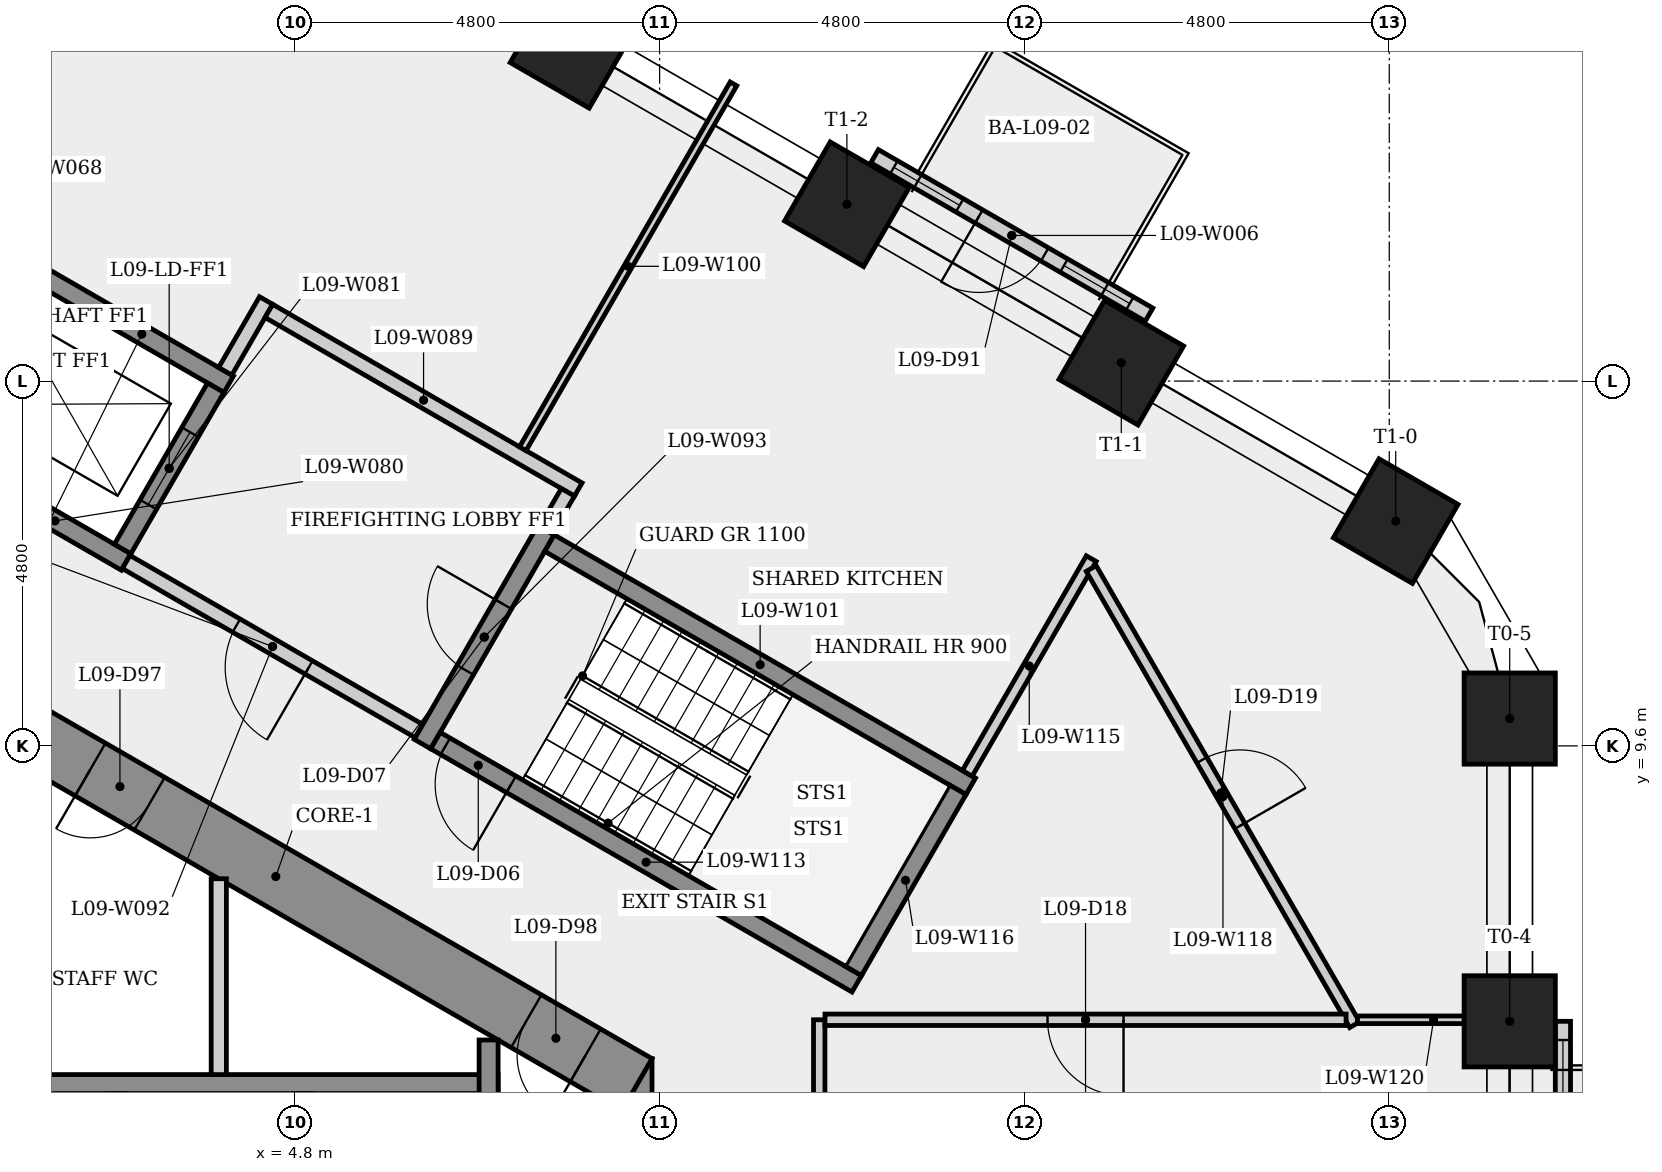
"""IFC4 building model, lengths in metres.
Left out: names, types, materials, properties, quantities, classifications, styles, units other than length and angle.
Written with IfcOpenShell. Run it as: python <this file> out.ifc"""

import sys

from ifc_helpers import new_model, si_unit, direction, frame, frame_2d, origin, origin_2d, place, context, subcontext, project, spatial, rectangle, extrude, element, fill, save


model = new_model("IFC4")
c1 = context("Model", 3, precision=1e-05, world=origin(), true_north=direction((0.0, 1.0)))
c2 = subcontext(c1, "Body", "Model", "MODEL_VIEW")
j1 = project(units=[si_unit("LENGTHUNIT", "METRE"), si_unit("PLANEANGLEUNIT", "RADIAN")], contexts=[c1])
p1 = place(None, origin())
s1 = spatial("IfcSite", under=j1, at=p1, CompositionType="ELEMENT")
p2 = place(p1, origin())
s2 = spatial("IfcBuilding", under=s1, at=p2, CompositionType="ELEMENT")
p3 = place(p2, frame((0.0, 0.0, 39.1)))
s3 = spatial("IfcBuildingStorey", under=s2, at=p3, CompositionType="ELEMENT", Elevation=39.1)
p4 = place(p3, frame((9.1, -5.485, 0.0), z_axis=(0.0, 0.0, 1.0), x_axis=(0.0, 1.0, 0.0)))
e1 = element("IfcWall", 1, at=p4, inside=s3, PredefinedType="SHEAR", context=c2, shape_type="SweptSolid", body=[
    extrude(rectangle(XDim=10.97, YDim=0.8, at=frame_2d((5.485, 0.0))), origin(), (0.0, 0.0, 1.0), 3.4),
])
p5 = place(p4, frame((4.685, 0.0, 0.0)))
e2 = element("IfcOpeningElement", 2, at=p5, cuts=e1, PredefinedType="OPENING", context=c2, shape_type="SweptSolid", body=[
    extrude(rectangle(XDim=1.6, YDim=2.1, at=frame_2d((0.8, 1.05))), frame((0.0, 0.41, 0.0), z_axis=(0.0, -1.0, 0.0), x_axis=(1.0, 0.0, 0.0)), (0.0, 0.0, 1.0), 0.82),
])
p6 = place(p3, frame((9.3, 5.138, 0.0), z_axis=(0.0, 0.0, 1.0), x_axis=(-0.866023993627, 0.500002442456, 0.0)))
e3 = element("IfcWall", 3, at=p6, inside=s3, PredefinedType="SHEAR", context=c2, shape_type="SweptSolid", body=[
    extrude(rectangle(XDim=10.97, YDim=0.8, at=frame_2d((5.485, 0.0))), origin(), (0.0, 0.0, 1.0), 3.4),
])
p7 = place(p6, frame((7.403, 0.0, 0.0)))
e4 = element("IfcOpeningElement", 4, at=p7, cuts=e3, PredefinedType="OPENING", context=c2, shape_type="SweptSolid", body=[
    extrude(rectangle(XDim=0.9, YDim=2.1, at=frame_2d((0.45, 1.05))), frame((0.0, 0.41, 0.0), z_axis=(0.0, -1.0, 0.0), x_axis=(1.0, 0.0, 0.0)), (0.0, 0.0, 1.0), 0.82),
])
p8 = place(p6, frame((0.78, 0.0, 0.0)))
e5 = element("IfcOpeningElement", 5, at=p8, cuts=e3, PredefinedType="OPENING", context=c2, shape_type="SweptSolid", body=[
    extrude(rectangle(XDim=0.9, YDim=2.1, at=frame_2d((0.45, 1.05))), frame((0.0, 0.41, 0.0), z_axis=(0.0, -1.0, 0.0), x_axis=(1.0, 0.0, 0.0)), (0.0, 0.0, 1.0), 0.82),
])
for number, where, z_axis, x_axis in (
    (6, (20.785, 5.976, 0.0), (0.0, 0.0, 1.0), (1.0, 0.0, 0.0)),
    (7, (20.785, 9.959, 0.0), (0.0, 0.0, 1.0), (1.0, 0.0, 0.0)),
    (8, (19.285, 12.558, 0.0), (0.0, 0.0, 1.0), (0.5, 0.866, 0.0)),
    (9, (15.674, 14.642, 0.0), (0.0, 0.0, 1.0), (0.5, 0.866, 0.0)),
    (10, (12.064, 16.727, 0.0), (0.0, 0.0, 1.0), (0.5, 0.866, 0.0)),
    (11, (8.454, 18.811, 0.0), (0.0, 0.0, 1.0), (0.5, 0.866, 0.0)),
):
    element("IfcColumn", number, at=place(p3, frame(where, z_axis=z_axis, x_axis=x_axis)), inside=s3, PredefinedType="COLUMN", context=c2, shape_type="SweptSolid", body=[
        extrude(rectangle(XDim=1.2, YDim=1.2, at=origin_2d()), origin(), (0.0, 0.0, 1.0), 3.4),
    ])
p9 = place(p3, frame((21.485, 1.992, 0.0), z_axis=(0.0, 0.0, 1.0), x_axis=(0.0, 1.0, 0.0)))
e12 = element("IfcWall", 12, at=p9, inside=s3, PredefinedType="SOLIDWALL", context=c2, shape_type="SweptSolid", body=[
    extrude(rectangle(XDim=3.984, YDim=0.2, at=frame_2d((1.992, 0.0))), origin(), (0.0, 0.0, 1.0), 3.4),
])
p10 = place(p9, frame((1.492, 0.0, 0.0)))
e13 = element("IfcOpeningElement", 13, at=p10, cuts=e12, PredefinedType="OPENING", context=c2, shape_type="SweptSolid", body=[
    extrude(rectangle(XDim=1.0, YDim=2.4, at=frame_2d((0.5, 1.2))), frame((0.0, 0.11, 0.0), z_axis=(0.0, -1.0, 0.0), x_axis=(1.0, 0.0, 0.0)), (0.0, 0.0, 1.0), 0.22),
])
p11 = place(p9, frame((0.246, 0.0, 0.9)))
e14 = element("IfcOpeningElement", 14, at=p11, cuts=e12, PredefinedType="OPENING", context=c2, shape_type="SweptSolid", body=[
    extrude(rectangle(XDim=1.0, YDim=1.5, at=frame_2d((0.5, 0.75))), frame((0.0, 0.11, 0.0), z_axis=(0.0, -1.0, 0.0), x_axis=(1.0, 0.0, 0.0)), (0.0, 0.0, 1.0), 0.22),
])
p12 = place(p9, frame((2.738, 0.0, 0.9)))
e15 = element("IfcOpeningElement", 15, at=p12, cuts=e12, PredefinedType="OPENING", context=c2, shape_type="SweptSolid", body=[
    extrude(rectangle(XDim=1.0, YDim=1.5, at=frame_2d((0.5, 0.75))), frame((0.0, 0.11, 0.0), z_axis=(0.0, -1.0, 0.0), x_axis=(1.0, 0.0, 0.0)), (0.0, 0.0, 1.0), 0.22),
])
p13 = place(p3, frame((16.039, 15.274, 0.0), z_axis=(0.0, 0.0, 1.0), x_axis=(-0.866036386482, 0.499980976928, 0.0)))
e16 = element("IfcWall", 16, at=p13, inside=s3, PredefinedType="SOLIDWALL", context=c2, shape_type="SweptSolid", body=[
    extrude(rectangle(XDim=4.169, YDim=0.2, at=frame_2d((2.084, 0.0))), origin(), (0.0, 0.0, 1.0), 3.4),
])
p14 = place(p13, frame((1.584, 0.0, 0.0)))
e17 = element("IfcOpeningElement", 17, at=p14, cuts=e16, PredefinedType="OPENING", context=c2, shape_type="SweptSolid", body=[
    extrude(rectangle(XDim=1.0, YDim=2.4, at=frame_2d((0.5, 1.2))), frame((0.0, 0.11, 0.0), z_axis=(0.0, -1.0, 0.0), x_axis=(1.0, 0.0, 0.0)), (0.0, 0.0, 1.0), 0.22),
])
p15 = place(p13, frame((0.292, 0.0, 0.9)))
e18 = element("IfcOpeningElement", 18, at=p15, cuts=e16, PredefinedType="OPENING", context=c2, shape_type="SweptSolid", body=[
    extrude(rectangle(XDim=1.0, YDim=1.5, at=frame_2d((0.5, 0.75))), frame((0.0, 0.11, 0.0), z_axis=(0.0, -1.0, 0.0), x_axis=(1.0, 0.0, 0.0)), (0.0, 0.0, 1.0), 0.22),
])
p16 = place(p13, frame((2.877, 0.0, 0.9)))
e19 = element("IfcOpeningElement", 19, at=p16, cuts=e16, PredefinedType="OPENING", context=c2, shape_type="SweptSolid", body=[
    extrude(rectangle(XDim=1.0, YDim=1.5, at=frame_2d((0.5, 0.75))), frame((0.0, 0.11, 0.0), z_axis=(0.0, -1.0, 0.0), x_axis=(1.0, 0.0, 0.0)), (0.0, 0.0, 1.0), 0.22),
])
p17 = place(p3, frame((-7.225, 5.15, 0.0), z_axis=(0.0, 0.0, 1.0), x_axis=(1.0, 0.0, 0.0)))
e20 = element("IfcWall", 20, at=p17, inside=s3, PredefinedType="SHEAR", context=c2, shape_type="SweptSolid", body=[
    extrude(rectangle(XDim=14.7, YDim=0.25, at=frame_2d((7.35, 0.0))), origin(), (0.0, 0.0, 1.0), 3.05),
])
p18 = place(p3, frame((1.073, 16.008, 0.0), z_axis=(0.0, 0.0, 1.0), x_axis=(0.866040211805, -0.499974350878, 0.0)))
e21 = element("IfcWall", 21, at=p18, inside=s3, PredefinedType="SHEAR", context=c2, shape_type="SweptSolid", body=[
    extrude(rectangle(XDim=3.3, YDim=0.25, at=frame_2d((1.65, 0.0))), origin(), (0.0, 0.0, 1.0), 3.05),
])
p19 = place(p3, frame((2.581, 12.02, 0.0), z_axis=(0.0, 0.0, 1.0), x_axis=(-0.86603892542, 0.499976579108, 0.0)))
e22 = element("IfcWall", 22, at=p19, inside=s3, PredefinedType="SHEAR", context=c2, shape_type="SweptSolid", body=[
    extrude(rectangle(XDim=2.162, YDim=0.25, at=frame_2d((1.081, 0.0))), origin(), (0.0, 0.0, 1.0), 3.05),
])
p20 = place(p3, frame((2.535, 12.191, 0.0), z_axis=(0.0, 0.0, 1.0), x_axis=(0.500061746146, 0.865989751695, 0.0)))
e23 = element("IfcWall", 23, at=p20, inside=s3, PredefinedType="SHEAR", context=c2, shape_type="SweptSolid", body=[
    extrude(rectangle(XDim=2.45, YDim=0.25, at=frame_2d((1.225, 0.0))), origin(), (0.0, 0.0, 1.0), 3.4),
])
p21 = place(p20, frame((0.675, 0.0, 0.0)))
e24 = element("IfcOpeningElement", 24, at=p21, cuts=e23, PredefinedType="OPENING", context=c2, shape_type="SweptSolid", body=[
    extrude(rectangle(XDim=1.1, YDim=2.1, at=frame_2d((0.55, 1.05))), frame((0.0, 0.135, 0.0), z_axis=(0.0, -1.0, 0.0), x_axis=(1.0, 0.0, 0.0)), (0.0, 0.0, 1.0), 0.27),
])
p22 = place(p3, frame((3.8, 7.852, 0.0), z_axis=(0.0, 0.0, 1.0), x_axis=(0.0, -1.0, 0.0)))
e25 = element("IfcWall", 25, at=p22, inside=s3, PredefinedType="PARTITIONING", context=c2, shape_type="SweptSolid", body=[
    extrude(rectangle(XDim=2.577, YDim=0.2, at=frame_2d((1.289, 0.0))), origin(), (0.0, 0.0, 1.0), 3.05),
])
p23 = place(p3, frame((3.885, 14.529, 0.0), z_axis=(0.0, 0.0, 1.0), x_axis=(0.499997628298, 0.866026773083, 0.0)))
e26 = element("IfcWall", 26, at=p23, inside=s3, PredefinedType="PARTITIONING", context=c2, shape_type="SweptSolid", body=[
    extrude(rectangle(XDim=1.075, YDim=0.2, at=frame_2d((0.538, 0.0))), origin(), (0.0, 0.0, 1.0), 3.05),
])
p24 = place(p3, frame((4.459, 15.323, 0.0), z_axis=(0.0, 0.0, 1.0), x_axis=(0.866016039709, -0.500016218704, 0.0)))
e27 = element("IfcWall", 27, at=p24, inside=s3, PredefinedType="PARTITIONING", context=c2, shape_type="SweptSolid", body=[
    extrude(rectangle(XDim=4.7, YDim=0.2, at=frame_2d((2.35, 0.0))), origin(), (0.0, 0.0, 1.0), 3.05),
])
p25 = place(p3, frame((6.435, 9.795, 0.0), z_axis=(0.0, 0.0, 1.0), x_axis=(-0.866012907634, 0.500021643343, 0.0)))
e28 = element("IfcWall", 28, at=p25, inside=s3, PredefinedType="PARTITIONING", context=c2, shape_type="SweptSolid", body=[
    extrude(rectangle(XDim=4.45, YDim=0.2, at=frame_2d((2.225, 0.0))), origin(), (0.0, 0.0, 1.0), 3.05),
])
p26 = place(p25, frame((1.675, 0.0, 0.0)))
e29 = element("IfcOpeningElement", 29, at=p26, cuts=e28, PredefinedType="OPENING", context=c2, shape_type="SweptSolid", body=[
    extrude(rectangle(XDim=1.1, YDim=2.1, at=frame_2d((0.55, 1.05))), frame((0.0, 0.11, 0.0), z_axis=(0.0, -1.0, 0.0), x_axis=(1.0, 0.0, 0.0)), (0.0, 0.0, 1.0), 0.22),
])
p27 = place(p3, frame((6.48, 9.624, 0.0), z_axis=(0.0, 0.0, 1.0), x_axis=(0.500017246033, 0.866015446554, 0.0)))
e30 = element("IfcWall", 30, at=p27, inside=s3, PredefinedType="SHEAR", context=c2, shape_type="SweptSolid", body=[
    extrude(rectangle(XDim=3.25, YDim=0.25, at=frame_2d((1.625, 0.0))), origin(), (0.0, 0.0, 1.0), 3.05),
])
p28 = place(p27, frame((1.125, 0.0, 0.0)))
e31 = element("IfcOpeningElement", 31, at=p28, cuts=e30, PredefinedType="OPENING", context=c2, shape_type="SweptSolid", body=[
    extrude(rectangle(XDim=1.0, YDim=2.1, at=frame_2d((0.5, 1.05))), frame((0.0, 0.135, 0.0), z_axis=(0.0, -1.0, 0.0), x_axis=(1.0, 0.0, 0.0)), (0.0, 0.0, 1.0), 0.27),
])
p29 = place(p3, frame((7.35, 5.73, 0.0), z_axis=(0.0, 0.0, 1.0), x_axis=(0.0, -1.0, 0.0)))
e32 = element("IfcWall", 32, at=p29, inside=s3, PredefinedType="SHEAR", context=c2, shape_type="SweptSolid", body=[
    extrude(rectangle(XDim=3.805, YDim=0.25, at=frame_2d((1.903, 0.0))), origin(), (0.0, 0.0, 1.0), 3.05),
])
p30 = place(p3, frame((7.8, 13.51, 0.0), z_axis=(0.0, 0.0, 1.0), x_axis=(0.4999855202, 0.866033763539, 0.0)))
e33 = element("IfcWall", 33, at=p30, inside=s3, PredefinedType="PARTITIONING", context=c2, shape_type="SweptSolid", body=[
    extrude(rectangle(XDim=5.543, YDim=0.1, at=frame_2d((2.771, 0.0))), origin(), (0.0, 0.0, 1.0), 3.05),
])
p31 = place(p3, frame((8.151, 12.268, 0.0), z_axis=(0.0, 0.0, 1.0), x_axis=(0.866025499775, -0.499999833739, 0.0)))
e34 = element("IfcWall", 34, at=p31, inside=s3, PredefinedType="SHEAR", context=c2, shape_type="SweptSolid", body=[
    extrude(rectangle(XDim=6.4, YDim=0.25, at=frame_2d((3.2, 0.0))), origin(), (0.0, 0.0, 1.0), 3.05),
])
p32 = place(p3, frame((8.393, 12.937, 0.0), z_axis=(0.0, 0.0, 1.0), x_axis=(-0.500065409566, -0.86598763626, 0.0)))
e35 = element("IfcWall", 35, at=p32, inside=s3, PredefinedType="PARTITIONING", context=c2, shape_type="SweptSolid", body=[
    extrude(rectangle(XDim=0.575, YDim=0.2, at=frame_2d((0.288, 0.0))), origin(), (0.0, 0.0, 1.0), 3.05),
])
p33 = place(p3, frame((11.7, -5.921, 0.0), z_axis=(0.0, 0.0, 1.0), x_axis=(0.0, 1.0, 0.0)))
e36 = element("IfcWall", 36, at=p33, inside=s3, PredefinedType="PARTITIONING", context=c2, shape_type="SweptSolid", body=[
    extrude(rectangle(XDim=11.918, YDim=0.15, at=frame_2d((5.959, 0.0))), origin(), (0.0, 0.0, 1.0), 3.05),
])
p34 = place(p33, frame((2.925, 0.0, 0.0)))
e37 = element("IfcOpeningElement", 37, at=p34, cuts=e36, PredefinedType="OPENING", context=c2, shape_type="SweptSolid", body=[
    extrude(rectangle(XDim=1.0, YDim=2.1, at=frame_2d((0.5, 1.05))), frame((0.0, 0.085, 0.0), z_axis=(0.0, -1.0, 0.0), x_axis=(1.0, 0.0, 0.0)), (0.0, 0.0, 1.0), 0.17),
])
p35 = place(p3, frame((12.194, 6.47, 0.0), z_axis=(0.0, 0.0, 1.0), x_axis=(-0.866025499775, 0.499999833739, 0.0)))
e38 = element("IfcWall", 38, at=p35, inside=s3, PredefinedType="SHEAR", context=c2, shape_type="SweptSolid", body=[
    extrude(rectangle(XDim=6.4, YDim=0.25, at=frame_2d((3.2, 0.0))), origin(), (0.0, 0.0, 1.0), 3.05),
])
p36 = place(p35, frame((5.25, 0.0, 0.0)))
e39 = element("IfcOpeningElement", 39, at=p36, cuts=e38, PredefinedType="OPENING", context=c2, shape_type="SweptSolid", body=[
    extrude(rectangle(XDim=1.0, YDim=2.1, at=frame_2d((0.5, 1.05))), frame((0.0, 0.135, 0.0), z_axis=(0.0, -1.0, 0.0), x_axis=(1.0, 0.0, 0.0)), (0.0, 0.0, 1.0), 0.27),
])
p37 = place(p3, frame((13.648, 9.239, 0.0), z_axis=(0.0, 0.0, 1.0), x_axis=(0.500026945261, 0.866009846372, 0.0)))
e40 = element("IfcWall", 40, at=p37, inside=s3, PredefinedType="PARTITIONING", context=c2, shape_type="SweptSolid", body=[
    extrude(rectangle(XDim=3.262, YDim=0.15, at=frame_2d((1.631, 0.0))), origin(), (0.0, 0.0, 1.0), 3.05),
])
p38 = place(p3, frame((13.523, 9.022, 0.0), z_axis=(0.0, 0.0, 1.0), x_axis=(-0.500034990121, -0.866005201286, 0.0)))
e41 = element("IfcWall", 41, at=p38, inside=s3, PredefinedType="SHEAR", context=c2, shape_type="SweptSolid", body=[
    extrude(rectangle(XDim=2.75, YDim=0.25, at=frame_2d((1.375, 0.0))), origin(), (0.0, 0.0, 1.0), 3.05),
])
p39 = place(p3, frame((15.279, 11.934, 0.0), z_axis=(0.0, 0.0, 1.0), x_axis=(0.500007034647, -0.866021342291, 0.0)))
e42 = element("IfcWall", 42, at=p39, inside=s3, PredefinedType="PARTITIONING", context=c2, shape_type="SweptSolid", body=[
    extrude(rectangle(XDim=6.931, YDim=0.15, at=frame_2d((3.466, 0.0))), origin(), (0.0, 0.0, 1.0), 3.05),
])
p40 = place(p39, frame((2.911, 0.0, 0.0)))
e43 = element("IfcOpeningElement", 43, at=p40, cuts=e42, PredefinedType="OPENING", context=c2, shape_type="SweptSolid", body=[
    extrude(rectangle(XDim=1.0, YDim=2.1, at=frame_2d((0.5, 1.05))), frame((0.0, 0.085, 0.0), z_axis=(0.0, -1.0, 0.0), x_axis=(1.0, 0.0, 0.0)), (0.0, 0.0, 1.0), 0.17),
])
p41 = place(p3, frame((18.782, 5.996, 0.0), z_axis=(0.0, 0.0, 1.0), x_axis=(1.0, 0.0, 0.0)))
e44 = element("IfcWall", 44, at=p41, inside=s3, PredefinedType="PARTITIONING", context=c2, shape_type="SweptSolid", body=[
    extrude(rectangle(XDim=2.003, YDim=0.1, at=frame_2d((1.001, 0.0))), origin(), (0.0, 0.0, 1.0), 3.05),
])
p42 = place(p3, frame((18.632, 5.996, 0.0), z_axis=(0.0, 0.0, 1.0), x_axis=(-1.0, 0.0, 0.0)))
e45 = element("IfcWall", 45, at=p42, inside=s3, PredefinedType="PARTITIONING", context=c2, shape_type="SweptSolid", body=[
    extrude(rectangle(XDim=6.856, YDim=0.15, at=frame_2d((3.428, 0.0))), origin(), (0.0, 0.0, 1.0), 3.05),
])
p43 = place(p42, frame((2.928, 0.0, 0.0)))
e46 = element("IfcOpeningElement", 46, at=p43, cuts=e45, PredefinedType="OPENING", context=c2, shape_type="SweptSolid", body=[
    extrude(rectangle(XDim=1.0, YDim=2.1, at=frame_2d((0.5, 1.05))), frame((0.0, 0.085, 0.0), z_axis=(0.0, -1.0, 0.0), x_axis=(1.0, 0.0, 0.0)), (0.0, 0.0, 1.0), 0.17),
])
p44 = place(p12, origin())
e47 = element("IfcWindow", 47, at=p44, inside=s3, PartitioningType="SINGLE_PANEL", PredefinedType="WINDOW", context=c2, shape_type="SweptSolid", body=[
    extrude(rectangle(XDim=1.0, YDim=1.5, at=frame_2d((0.5, 0.75))), frame((0.0, 0.03, 0.0), z_axis=(0.0, -1.0, 0.0), x_axis=(1.0, 0.0, 0.0)), (0.0, 0.0, 1.0), 0.06),
])
fill(e15, e47)
p45 = place(p14, origin())
e48 = element("IfcDoor", 48, at=p45, inside=s3, OperationType="SINGLE_SWING_RIGHT", PredefinedType="DOOR", context=c2, shape_type="SweptSolid", body=[
    extrude(rectangle(XDim=1.0, YDim=2.4, at=frame_2d((0.5, 1.2))), frame((0.0, 0.025, 0.0), z_axis=(0.0, -1.0, 0.0), x_axis=(1.0, 0.0, 0.0)), (0.0, 0.0, 1.0), 0.05),
])
fill(e17, e48)
p46 = place(p15, origin())
e49 = element("IfcWindow", 49, at=p46, inside=s3, PartitioningType="SINGLE_PANEL", PredefinedType="WINDOW", context=c2, shape_type="SweptSolid", body=[
    extrude(rectangle(XDim=1.0, YDim=1.5, at=frame_2d((0.5, 0.75))), frame((0.0, 0.03, 0.0), z_axis=(0.0, -1.0, 0.0), x_axis=(1.0, 0.0, 0.0)), (0.0, 0.0, 1.0), 0.06),
])
fill(e18, e49)
p47 = place(p16, origin())
e50 = element("IfcWindow", 50, at=p47, inside=s3, PartitioningType="SINGLE_PANEL", PredefinedType="WINDOW", context=c2, shape_type="SweptSolid", body=[
    extrude(rectangle(XDim=1.0, YDim=1.5, at=frame_2d((0.5, 0.75))), frame((0.0, 0.03, 0.0), z_axis=(0.0, -1.0, 0.0), x_axis=(1.0, 0.0, 0.0)), (0.0, 0.0, 1.0), 0.06),
])
fill(e19, e50)
p48 = place(p36, origin())
e51 = element("IfcDoor", 51, at=p48, inside=s3, OperationType="SINGLE_SWING_LEFT", PredefinedType="DOOR", context=c2, shape_type="SweptSolid", body=[
    extrude(rectangle(XDim=1.0, YDim=2.1, at=frame_2d((0.5, 1.05))), frame((0.0, 0.025, 0.0), z_axis=(0.0, -1.0, 0.0), x_axis=(1.0, 0.0, 0.0)), (0.0, 0.0, 1.0), 0.05),
])
fill(e39, e51)
p49 = place(p28, origin())
e52 = element("IfcDoor", 52, at=p49, inside=s3, OperationType="SINGLE_SWING_RIGHT", PredefinedType="DOOR", context=c2, shape_type="SweptSolid", body=[
    extrude(rectangle(XDim=1.0, YDim=2.1, at=frame_2d((0.5, 1.05))), frame((0.0, 0.025, 0.0), z_axis=(0.0, -1.0, 0.0), x_axis=(1.0, 0.0, 0.0)), (0.0, 0.0, 1.0), 0.05),
])
fill(e31, e52)
p50 = place(p26, origin())
e53 = element("IfcDoor", 53, at=p50, inside=s3, OperationType="SINGLE_SWING_LEFT", PredefinedType="DOOR", context=c2, shape_type="SweptSolid", body=[
    extrude(rectangle(XDim=1.1, YDim=2.1, at=frame_2d((0.55, 1.05))), frame((0.0, 0.025, 0.0), z_axis=(0.0, -1.0, 0.0), x_axis=(1.0, 0.0, 0.0)), (0.0, 0.0, 1.0), 0.05),
])
fill(e29, e53)
p51 = place(p21, origin())
e54 = element("IfcDoor", 54, at=p51, inside=s3, OperationType="SLIDING_TO_LEFT", PredefinedType="DOOR", context=c2, shape_type="SweptSolid", body=[
    extrude(rectangle(XDim=1.1, YDim=2.1, at=frame_2d((0.55, 1.05))), frame((0.0, 0.025, 0.0), z_axis=(0.0, -1.0, 0.0), x_axis=(1.0, 0.0, 0.0)), (0.0, 0.0, 1.0), 0.05),
])
fill(e24, e54)
p52 = place(p43, origin())
e55 = element("IfcDoor", 55, at=p52, inside=s3, OperationType="SINGLE_SWING_LEFT", PredefinedType="DOOR", context=c2, shape_type="SweptSolid", body=[
    extrude(rectangle(XDim=1.0, YDim=2.1, at=frame_2d((0.5, 1.05))), frame((0.0, 0.025, 0.0), z_axis=(0.0, -1.0, 0.0), x_axis=(1.0, 0.0, 0.0)), (0.0, 0.0, 1.0), 0.05),
])
fill(e46, e55)
p53 = place(p40, origin())
e56 = element("IfcDoor", 56, at=p53, inside=s3, OperationType="SINGLE_SWING_RIGHT", PredefinedType="DOOR", context=c2, shape_type="SweptSolid", body=[
    extrude(rectangle(XDim=1.0, YDim=2.1, at=frame_2d((0.5, 1.05))), frame((0.0, 0.025, 0.0), z_axis=(0.0, -1.0, 0.0), x_axis=(1.0, 0.0, 0.0)), (0.0, 0.0, 1.0), 0.05),
])
fill(e43, e56)
p54 = place(p7, origin())
e57 = element("IfcDoor", 57, at=p54, inside=s3, OperationType="SINGLE_SWING_RIGHT", PredefinedType="DOOR", context=c2, shape_type="SweptSolid", body=[
    extrude(rectangle(XDim=0.9, YDim=2.1, at=frame_2d((0.45, 1.05))), frame((0.0, 0.025, 0.0), z_axis=(0.0, -1.0, 0.0), x_axis=(1.0, 0.0, 0.0)), (0.0, 0.0, 1.0), 0.05),
])
fill(e4, e57)
p55 = place(p8, origin())
e58 = element("IfcDoor", 58, at=p55, inside=s3, OperationType="SINGLE_SWING_LEFT", PredefinedType="DOOR", context=c2, shape_type="SweptSolid", body=[
    extrude(rectangle(XDim=0.9, YDim=2.1, at=frame_2d((0.45, 1.05))), frame((0.0, 0.025, 0.0), z_axis=(0.0, -1.0, 0.0), x_axis=(1.0, 0.0, 0.0)), (0.0, 0.0, 1.0), 0.05),
])
fill(e5, e58)
save(model, sys.argv[1])
